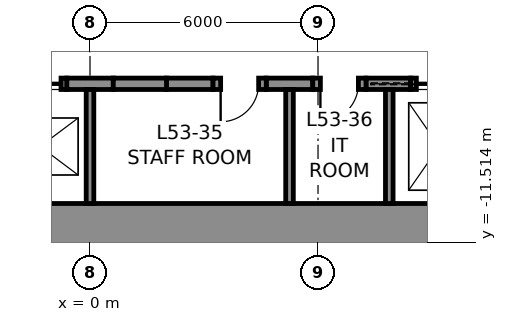
"""IFC4 building model, lengths in metres.
Left out: names, types, materials, properties, quantities, classifications, styles, units other than length and angle.
Written with IfcOpenShell. Run it as: python <this file> out.ifc"""

import sys

from ifc_helpers import new_model, si_unit, direction, frame, frame_2d, origin, place, context, subcontext, project, spatial, rectangle, extrude, element, fill, save


model = new_model("IFC4")
c1 = context("Model", 3, precision=1e-05, world=origin(), true_north=direction((0.0, 1.0)))
c2 = subcontext(c1, "Body", "Model", "MODEL_VIEW")
j1 = project(units=[si_unit("LENGTHUNIT", "METRE"), si_unit("PLANEANGLEUNIT", "RADIAN")], contexts=[c1])
p1 = place(None, origin())
s1 = spatial("IfcSite", under=j1, at=p1, CompositionType="ELEMENT")
p2 = place(p1, origin())
s2 = spatial("IfcBuilding", under=s1, at=p2, CompositionType="ELEMENT")
p3 = place(p2, frame((0.0, 0.0, 241.8)))
s3 = spatial("IfcBuildingStorey", under=s2, at=p3, CompositionType="ELEMENT", Elevation=241.8)
p4 = place(p3, frame((12.0, -11.25, 0.0), z_axis=(0.0, 0.0, 1.0), x_axis=(-1.0, 0.0, 0.0)))
e1 = element("IfcWall", 1, at=p4, inside=s3, PredefinedType="SHEAR", context=c2, shape_type="SweptSolid", body=[
    extrude(rectangle(XDim=24.0, YDim=1.5, at=frame_2d((12.0, 0.0))), origin(), (0.0, 0.0, 1.0), 4.0),
])
for number, where, z_axis, x_axis in (
    (2, (-0.613, -7.35, 0.0), (0.0, 0.0, 1.0), (1.0, 0.0, 0.0)),
    (3, (2.012, -7.35, 0.0), (0.0, 0.0, 1.0), (1.0, 0.0, 0.0)),
    (4, (4.637, -7.35, 0.0), (0.0, 0.0, 1.0), (1.0, 0.0, 0.0)),
):
    element("IfcWall", number, at=place(p3, frame(where, z_axis=z_axis, x_axis=x_axis)), inside=s3, PredefinedType="SHEAR", context=c2, shape_type="SweptSolid", body=[
        extrude(rectangle(XDim=1.225, YDim=0.3, at=frame_2d((0.613, 0.0))), origin(), (0.0, 0.0, 1.0), 4.0),
    ])
p5 = place(p3, frame((7.262, -7.35, 0.0), z_axis=(0.0, 0.0, 1.0), x_axis=(1.0, 0.0, 0.0)))
e5 = element("IfcWall", 5, at=p5, inside=s3, PredefinedType="SHEAR", context=c2, shape_type="SweptSolid", body=[
    extrude(rectangle(XDim=1.175, YDim=0.3, at=frame_2d((0.587, 0.0))), origin(), (0.0, 0.0, 1.0), 4.0),
])
p6 = place(p3, frame((-2.012, -7.35, 0.0), z_axis=(0.0, 0.0, 1.0), x_axis=(1.0, 0.0, 0.0)))
e6 = element("IfcWall", 6, at=p6, inside=s3, PredefinedType="PARTITIONING", context=c2, shape_type="SweptSolid", body=[
    extrude(rectangle(XDim=1.4, YDim=0.3, at=frame_2d((0.7, 0.0))), origin(), (0.0, 0.0, 1.0), 4.0),
])
p7 = place(p6, frame((0.15, 0.0, 0.0)))
e7 = element("IfcOpeningElement", 7, at=p7, cuts=e6, PredefinedType="OPENING", context=c2, shape_type="SweptSolid", body=[
    extrude(rectangle(XDim=1.1, YDim=2.3, at=frame_2d((0.55, 1.15))), frame((0.0, 0.16, 0.0), z_axis=(0.0, -1.0, 0.0), x_axis=(1.0, 0.0, 0.0)), (0.0, 0.0, 1.0), 0.32),
])
p8 = place(p3, frame((0.613, -7.35, 0.0), z_axis=(0.0, 0.0, 1.0), x_axis=(1.0, 0.0, 0.0)))
e8 = element("IfcWall", 8, at=p8, inside=s3, PredefinedType="PARTITIONING", context=c2, shape_type="SweptSolid", body=[
    extrude(rectangle(XDim=1.4, YDim=0.3, at=frame_2d((0.7, 0.0))), origin(), (0.0, 0.0, 1.0), 4.0),
])
p9 = place(p3, frame((3.238, -7.35, 0.0), z_axis=(0.0, 0.0, 1.0), x_axis=(1.0, 0.0, 0.0)))
e9 = element("IfcWall", 9, at=p9, inside=s3, PredefinedType="PARTITIONING", context=c2, shape_type="SweptSolid", body=[
    extrude(rectangle(XDim=1.4, YDim=0.3, at=frame_2d((0.7, 0.0))), origin(), (0.0, 0.0, 1.0), 4.0),
])
p10 = place(p9, frame((0.2, 0.0, 0.0)))
e10 = element("IfcOpeningElement", 10, at=p10, cuts=e9, PredefinedType="OPENING", context=c2, shape_type="SweptSolid", body=[
    extrude(rectangle(XDim=1.0, YDim=2.3, at=frame_2d((0.5, 1.15))), frame((0.0, 0.16, 0.0), z_axis=(0.0, -1.0, 0.0), x_axis=(1.0, 0.0, 0.0)), (0.0, 0.0, 1.0), 0.32),
])
p11 = place(p3, frame((5.863, -7.35, 0.0), z_axis=(0.0, 0.0, 1.0), x_axis=(1.0, 0.0, 0.0)))
e11 = element("IfcWall", 11, at=p11, inside=s3, PredefinedType="PARTITIONING", context=c2, shape_type="SweptSolid", body=[
    extrude(rectangle(XDim=1.4, YDim=0.3, at=frame_2d((0.7, 0.0))), origin(), (0.0, 0.0, 1.0), 4.0),
])
p12 = place(p11, frame((0.2, 0.0, 0.0)))
e12 = element("IfcOpeningElement", 12, at=p12, cuts=e11, PredefinedType="OPENING", context=c2, shape_type="SweptSolid", body=[
    extrude(rectangle(XDim=1.0, YDim=2.3, at=frame_2d((0.5, 1.15))), frame((0.0, 0.16, 0.0), z_axis=(0.0, -1.0, 0.0), x_axis=(1.0, 0.0, 0.0)), (0.0, 0.0, 1.0), 0.32),
])
p13 = place(p3, frame((8.438, -7.35, 0.0), z_axis=(0.0, 0.0, 1.0), x_axis=(1.0, 0.0, 0.0)))
e13 = element("IfcWall", 13, at=p13, inside=s3, PredefinedType="PARTITIONING", context=c2, shape_type="SweptSolid", body=[
    extrude(rectangle(XDim=1.5, YDim=0.3, at=frame_2d((0.75, 0.0))), origin(), (0.0, 0.0, 1.0), 4.0),
])
p14 = place(p13, frame((0.15, 0.0, 0.0)))
e14 = element("IfcOpeningElement", 14, at=p14, cuts=e13, PredefinedType="OPENING", context=c2, shape_type="SweptSolid", body=[
    extrude(rectangle(XDim=1.2, YDim=2.3, at=frame_2d((0.6, 1.15))), frame((0.0, 0.16, 0.0), z_axis=(0.0, -1.0, 0.0), x_axis=(1.0, 0.0, 0.0)), (0.0, 0.0, 1.0), 0.32),
])
for number, where, z_axis, x_axis in (
    (15, (0.0, -10.5, 0.0), (0.0, 0.0, 1.0), (0.0, 1.0, 0.0)),
    (16, (5.25, -10.5, 0.0), (0.0, 0.0, 1.0), (0.0, 1.0, 0.0)),
    (17, (7.875, -10.5, 0.0), (0.0, 0.0, 1.0), (0.0, 1.0, 0.0)),
):
    element("IfcWall", number, at=place(p3, frame(where, z_axis=z_axis, x_axis=x_axis)), inside=s3, PredefinedType="PARTITIONING", context=c2, shape_type="SweptSolid", body=[
        extrude(rectangle(XDim=3.0, YDim=0.2, at=frame_2d((1.5, 0.0))), origin(), (0.0, 0.0, 1.0), 4.0),
    ])
p15 = place(p10, frame((1.0, 0.0, 0.0), z_axis=(0.0, 0.0, 1.0), x_axis=(-1.0, 0.0, 0.0)))
e18 = element("IfcDoor", 18, at=p15, inside=s3, OperationType="SINGLE_SWING_RIGHT", PredefinedType="DOOR", context=c2, shape_type="SweptSolid", body=[
    extrude(rectangle(XDim=1.0, YDim=2.3, at=frame_2d((0.5, 1.15))), frame((0.0, 0.025, 0.0), z_axis=(0.0, -1.0, 0.0), x_axis=(1.0, 0.0, 0.0)), (0.0, 0.0, 1.0), 0.05),
])
fill(e10, e18)
p16 = place(p12, frame((1.0, 0.0, 0.0), z_axis=(0.0, 0.0, 1.0), x_axis=(-1.0, 0.0, 0.0)))
e19 = element("IfcDoor", 19, at=p16, inside=s3, OperationType="SINGLE_SWING_RIGHT", PredefinedType="DOOR", context=c2, shape_type="SweptSolid", body=[
    extrude(rectangle(XDim=1.0, YDim=2.3, at=frame_2d((0.5, 1.15))), frame((0.0, 0.025, 0.0), z_axis=(0.0, -1.0, 0.0), x_axis=(1.0, 0.0, 0.0)), (0.0, 0.0, 1.0), 0.05),
])
fill(e12, e19)
p17 = place(p14, origin())
e20 = element("IfcDoor", 20, at=p17, inside=s3, OperationType="SLIDING_TO_LEFT", PredefinedType="DOOR", context=c2, shape_type="SweptSolid", body=[
    extrude(rectangle(XDim=1.2, YDim=2.3, at=frame_2d((0.6, 1.15))), frame((0.0, 0.025, 0.0), z_axis=(0.0, -1.0, 0.0), x_axis=(1.0, 0.0, 0.0)), (0.0, 0.0, 1.0), 0.05),
])
fill(e14, e20)
p18 = place(p7, origin())
e21 = element("IfcDoor", 21, at=p18, inside=s3, OperationType="SLIDING_TO_LEFT", PredefinedType="DOOR", context=c2, shape_type="SweptSolid", body=[
    extrude(rectangle(XDim=1.1, YDim=2.3, at=frame_2d((0.55, 1.15))), frame((0.0, 0.025, 0.0), z_axis=(0.0, -1.0, 0.0), x_axis=(1.0, 0.0, 0.0)), (0.0, 0.0, 1.0), 0.05),
])
fill(e7, e21)
save(model, sys.argv[1])
